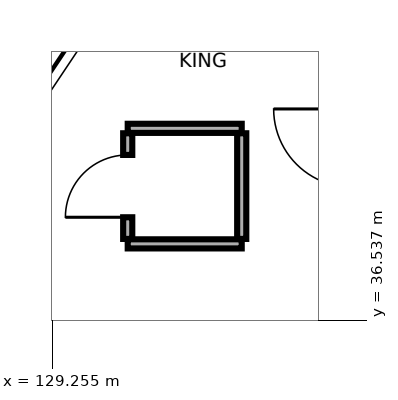
"""IFC4 building model, lengths in metres.
Left out: names, types, materials, properties, quantities, classifications, styles, units other than length and angle.
Written with IfcOpenShell. Run it as: python <this file> out.ifc"""

import sys

from ifc_helpers import new_model, si_unit, direction, frame, frame_2d, origin, place, context, subcontext, project, spatial, rectangle, extrude, element, fill, save


model = new_model("IFC4")
c1 = context("Model", 3, precision=1e-05, world=origin(), true_north=direction((0.0, 1.0)))
c2 = subcontext(c1, "Body", "Model", "MODEL_VIEW")
j1 = project(units=[si_unit("LENGTHUNIT", "METRE"), si_unit("PLANEANGLEUNIT", "RADIAN")], contexts=[c1])
p1 = place(None, origin())
s1 = spatial("IfcSite", under=j1, at=p1, CompositionType="ELEMENT")
p2 = place(p1, origin())
s2 = spatial("IfcBuilding", under=s1, at=p2, CompositionType="ELEMENT")
p3 = place(p2, frame((0.0, 0.0, 38.5)))
s3 = spatial("IfcBuildingStorey", under=s2, at=p3, CompositionType="ELEMENT", Elevation=38.5)
for number, where, z_axis, x_axis in (
    (1, (130.25, 37.54, 0.0), (0.0, 0.0, 1.0), (1.0, 0.0, 0.0)),
    (2, (130.25, 39.06, 0.0), (0.0, 0.0, 1.0), (1.0, 0.0, 0.0)),
):
    element("IfcWall", number, at=place(p3, frame(where, z_axis=z_axis, x_axis=x_axis)), inside=s3, PredefinedType="PARTITIONING", context=c2, shape_type="SweptSolid", body=[
        extrude(rectangle(XDim=1.5, YDim=0.12, at=frame_2d((0.75, 0.0))), origin(), (0.0, 0.0, 1.0), 3.15),
    ])
p4 = place(p3, frame((130.25, 37.605, 0.0), z_axis=(0.0, 0.0, 1.0), x_axis=(0.0, 1.0, 0.0)))
e3 = element("IfcWall", 3, at=p4, inside=s3, PredefinedType="PARTITIONING", context=c2, shape_type="SweptSolid", body=[
    extrude(rectangle(XDim=1.39, YDim=0.12, at=frame_2d((0.695, 0.0))), origin(), (0.0, 0.0, 1.0), 2.735),
])
p5 = place(p4, frame((0.285, 0.0, 0.0)))
e4 = element("IfcOpeningElement", 4, at=p5, cuts=e3, PredefinedType="OPENING", context=c2, shape_type="SweptSolid", body=[
    extrude(rectangle(XDim=0.82, YDim=2.08, at=frame_2d((0.41, 1.04))), frame((0.0, 0.07, 0.0), z_axis=(0.0, -1.0, 0.0), x_axis=(1.0, 0.0, 0.0)), (0.0, 0.0, 1.0), 0.14),
])
p6 = place(p3, frame((131.75, 37.605, 0.0), z_axis=(0.0, 0.0, 1.0), x_axis=(0.0, 1.0, 0.0)))
e5 = element("IfcWall", 5, at=p6, inside=s3, PredefinedType="PARTITIONING", context=c2, shape_type="SweptSolid", body=[
    extrude(rectangle(XDim=1.39, YDim=0.12, at=frame_2d((0.695, 0.0))), origin(), (0.0, 0.0, 1.0), 2.735),
])
p7 = place(p5, origin())
e6 = element("IfcDoor", 6, at=p7, inside=s3, OperationType="SINGLE_SWING_LEFT", PredefinedType="DOOR", context=c2, shape_type="SweptSolid", body=[
    extrude(rectangle(XDim=0.82, YDim=2.08, at=frame_2d((0.41, 1.04))), frame((0.0, 0.025, 0.0), z_axis=(0.0, -1.0, 0.0), x_axis=(1.0, 0.0, 0.0)), (0.0, 0.0, 1.0), 0.05),
])
fill(e4, e6)
save(model, sys.argv[1])
